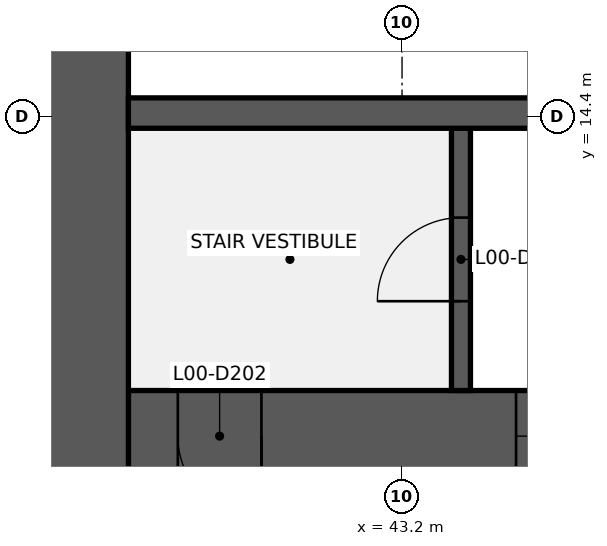
"""IFC4 building model, lengths in metres.
Left out: names, types, materials, properties, quantities, classifications, styles, units other than length and angle.
Written with IfcOpenShell. Run it as: python <this file> out.ifc"""

import sys

from ifc_helpers import new_model, si_unit, direction, frame, frame_2d, origin, place, context, subcontext, project, spatial, rectangle, extrude, element, fill, save


model = new_model("IFC4")
c1 = context("Model", 3, precision=1e-05, world=origin(), true_north=direction((0.0, 1.0)))
c2 = subcontext(c1, "Body", "Model", "MODEL_VIEW")
j1 = project(units=[si_unit("LENGTHUNIT", "METRE"), si_unit("PLANEANGLEUNIT", "RADIAN")], contexts=[c1])
p1 = place(None, origin())
s1 = spatial("IfcSite", under=j1, at=p1, CompositionType="ELEMENT")
p2 = place(p1, origin())
s2 = spatial("IfcBuilding", under=s1, at=p2, CompositionType="ELEMENT")
p3 = place(p2, origin())
s3 = spatial("IfcBuildingStorey", under=s2, at=p3, CompositionType="ELEMENT", Elevation=0.0)
p4 = place(p3, frame((56.4, 10.2, -2.0), z_axis=(0.0, 0.0, 1.0), x_axis=(-1.0, 0.0, 0.0)))
e1 = element("IfcWall", 1, at=p4, inside=s3, PredefinedType="SHEAR", context=c2, shape_type="SweptSolid", body=[
    extrude(rectangle(XDim=16.8, YDim=1.2, at=frame_2d((8.4, 0.0))), origin(), (0.0, 0.0, 1.0), 14.3),
])
p5 = place(p4, frame((15.05, 0.0, 2.0)))
e2 = element("IfcOpeningElement", 2, at=p5, cuts=e1, PredefinedType="OPENING", context=c2, shape_type="SweptSolid", body=[
    extrude(rectangle(XDim=1.1, YDim=2.1, at=frame_2d((0.55, 1.05))), frame((0.0, 0.61, 0.0), z_axis=(0.0, -1.0, 0.0), x_axis=(1.0, 0.0, 0.0)), (0.0, 0.0, 1.0), 1.22),
])
p6 = place(p4, frame((5.1, 0.0, 2.9)))
e3 = element("IfcOpeningElement", 3, at=p6, cuts=e1, PredefinedType="OPENING", context=c2, shape_type="SweptSolid", body=[
    extrude(rectangle(XDim=1.8, YDim=1.5, at=frame_2d((0.9, 0.75))), frame((0.0, 0.61, 0.0), z_axis=(0.0, -1.0, 0.0), x_axis=(1.0, 0.0, 0.0)), (0.0, 0.0, 1.0), 1.22),
])
p7 = place(p4, frame((9.9, 0.0, 2.9)))
e4 = element("IfcOpeningElement", 4, at=p7, cuts=e1, PredefinedType="OPENING", context=c2, shape_type="SweptSolid", body=[
    extrude(rectangle(XDim=1.8, YDim=1.5, at=frame_2d((0.9, 0.75))), frame((0.0, 0.61, 0.0), z_axis=(0.0, -1.0, 0.0), x_axis=(1.0, 0.0, 0.0)), (0.0, 0.0, 1.0), 1.22),
])
p8 = place(p3, frame((39.0, 9.6, -2.0), z_axis=(0.0, 0.0, 1.0), x_axis=(0.0, 1.0, 0.0)))
e5 = element("IfcWall", 5, at=p8, inside=s3, PredefinedType="SHEAR", context=c2, shape_type="SweptSolid", body=[
    extrude(rectangle(XDim=28.8, YDim=1.2, at=frame_2d((14.4, 0.0))), origin(), (0.0, 0.0, 1.0), 14.3),
])
p9 = place(p8, frame((8.7, 0.0, 2.0)))
e6 = element("IfcOpeningElement", 6, at=p9, cuts=e5, PredefinedType="OPENING", context=c2, shape_type="SweptSolid", body=[
    extrude(rectangle(XDim=1.8, YDim=2.1, at=frame_2d((0.9, 1.05))), frame((0.0, 0.61, 0.0), z_axis=(0.0, -1.0, 0.0), x_axis=(1.0, 0.0, 0.0)), (0.0, 0.0, 1.0), 1.22),
])
p10 = place(p8, frame((18.3, 0.0, 2.0)))
e7 = element("IfcOpeningElement", 7, at=p10, cuts=e5, PredefinedType="OPENING", context=c2, shape_type="SweptSolid", body=[
    extrude(rectangle(XDim=1.8, YDim=2.1, at=frame_2d((0.9, 1.05))), frame((0.0, 0.61, 0.0), z_axis=(0.0, -1.0, 0.0), x_axis=(1.0, 0.0, 0.0)), (0.0, 0.0, 1.0), 1.22),
])
p11 = place(p3, frame((43.975, 10.8, -2.0), z_axis=(0.0, 0.0, 1.0), x_axis=(0.0, 1.0, 0.0)))
e8 = element("IfcWall", 8, at=p11, inside=s3, PredefinedType="SHEAR", context=c2, shape_type="SweptSolid", body=[
    extrude(rectangle(XDim=3.45, YDim=0.25, at=frame_2d((1.725, 0.0))), origin(), (0.0, 0.0, 1.0), 14.3),
])
p12 = place(p11, frame((1.175, 0.0, 2.0)))
e9 = element("IfcOpeningElement", 9, at=p12, cuts=e8, PredefinedType="OPENING", context=c2, shape_type="SweptSolid", body=[
    extrude(rectangle(XDim=1.1, YDim=2.1, at=frame_2d((0.55, 1.05))), frame((0.0, 0.135, 0.0), z_axis=(0.0, -1.0, 0.0), x_axis=(1.0, 0.0, 0.0)), (0.0, 0.0, 1.0), 0.27),
])
p13 = place(p3, frame((39.6, 14.45, -2.0), z_axis=(0.0, 0.0, 1.0), x_axis=(1.0, 0.0, 0.0)))
e10 = element("IfcWall", 10, at=p13, inside=s3, PredefinedType="SHEAR", context=c2, shape_type="SweptSolid", body=[
    extrude(rectangle(XDim=16.8, YDim=0.4, at=frame_2d((8.4, 0.0))), origin(), (0.0, 0.0, 1.0), 14.3),
])
p14 = place(p12, origin())
e11 = element("IfcDoor", 11, at=p14, inside=s3, OperationType="SINGLE_SWING_LEFT", PredefinedType="DOOR", context=c2, shape_type="SweptSolid", body=[
    extrude(rectangle(XDim=1.1, YDim=2.1, at=frame_2d((0.55, 1.05))), frame((0.0, 0.025, 0.0), z_axis=(0.0, -1.0, 0.0), x_axis=(1.0, 0.0, 0.0)), (0.0, 0.0, 1.0), 0.05),
])
fill(e9, e11)
p15 = place(p5, origin())
e12 = element("IfcDoor", 12, at=p15, inside=s3, OperationType="SINGLE_SWING_LEFT", PredefinedType="DOOR", context=c2, shape_type="SweptSolid", body=[
    extrude(rectangle(XDim=1.1, YDim=2.1, at=frame_2d((0.55, 1.05))), frame((0.0, 0.025, 0.0), z_axis=(0.0, -1.0, 0.0), x_axis=(1.0, 0.0, 0.0)), (0.0, 0.0, 1.0), 0.05),
])
fill(e2, e12)
p16 = place(p7, origin())
e13 = element("IfcWindow", 13, at=p16, inside=s3, PartitioningType="SINGLE_PANEL", PredefinedType="WINDOW", context=c2, shape_type="SweptSolid", body=[
    extrude(rectangle(XDim=1.8, YDim=1.5, at=frame_2d((0.9, 0.75))), frame((0.0, 0.03, 0.0), z_axis=(0.0, -1.0, 0.0), x_axis=(1.0, 0.0, 0.0)), (0.0, 0.0, 1.0), 0.06),
])
fill(e4, e13)
save(model, sys.argv[1])
